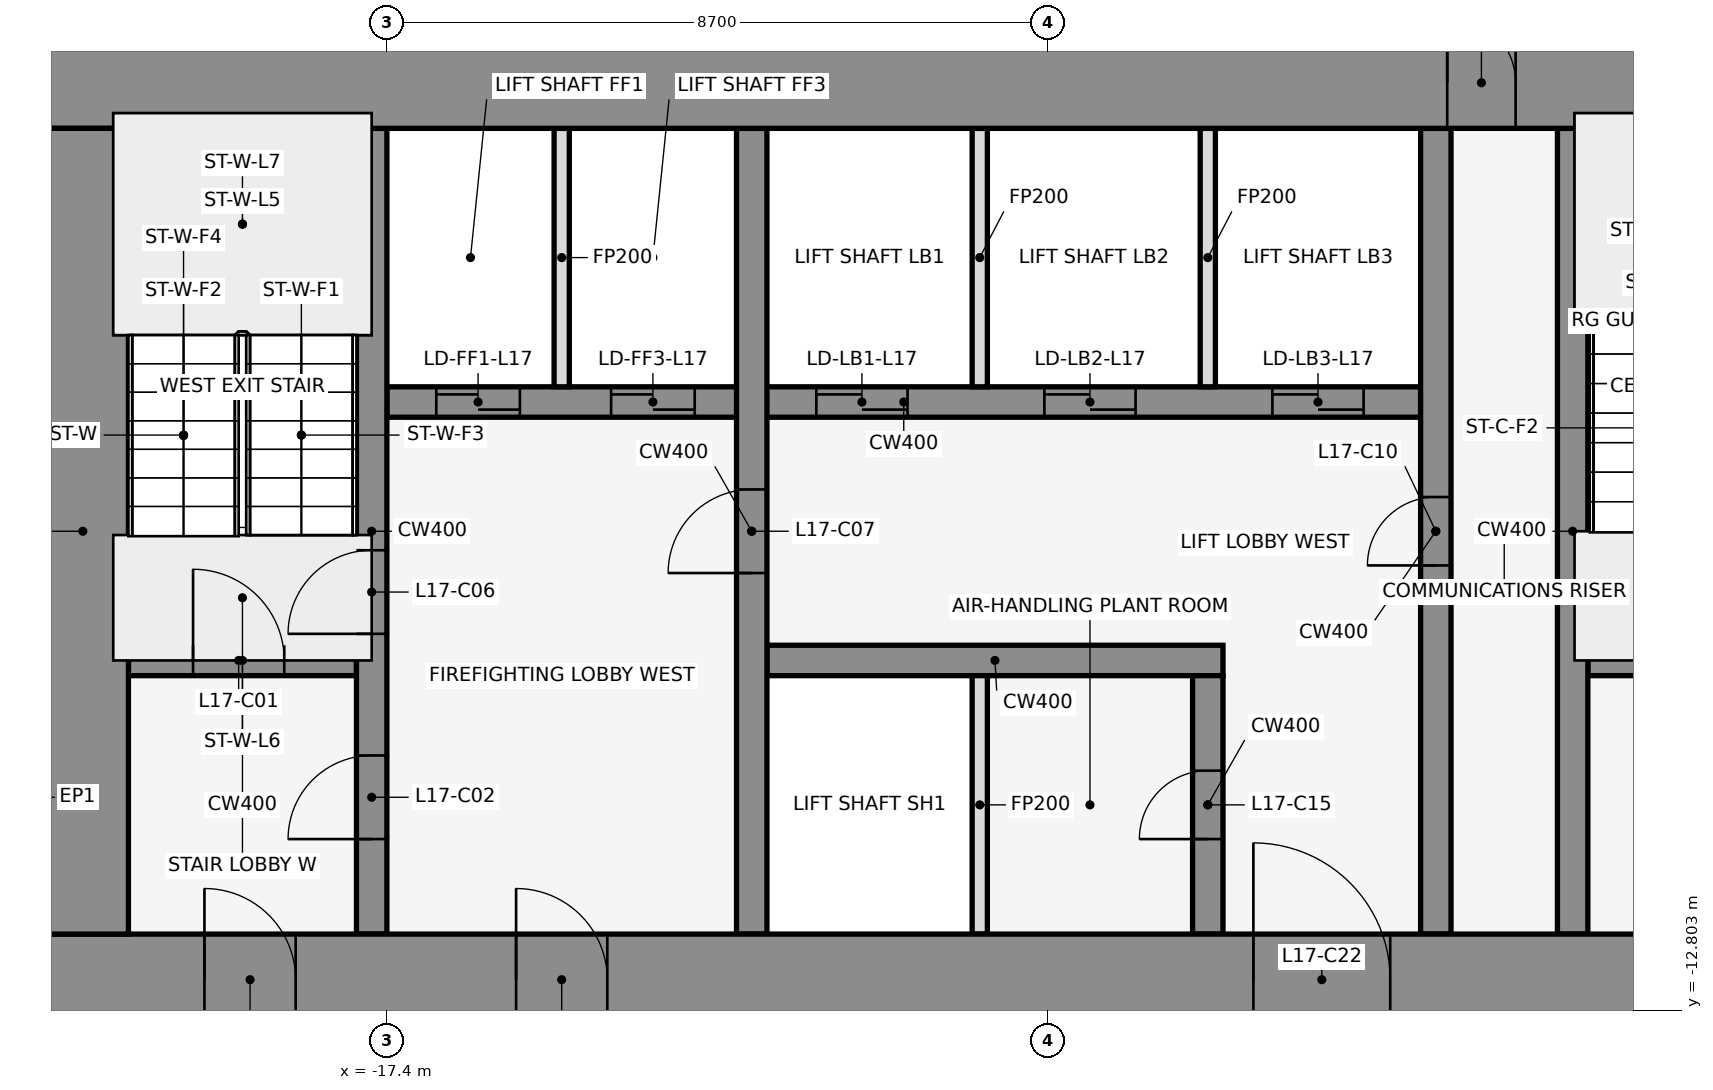
"""IFC4 building model, lengths in metres.
Left out: names, types, materials, properties, quantities, classifications, styles, units other than length and angle.
Written with IfcOpenShell. Run it as: python <this file> out.ifc"""

import sys

from ifc_helpers import new_model, si_unit, direction, frame, frame_2d, origin, place, context, subcontext, project, spatial, rectangle, extrude, element, fill, save


model = new_model("IFC4")
c1 = context("Model", 3, precision=1e-05, world=origin(), true_north=direction((0.0, 1.0)))
c2 = subcontext(c1, "Body", "Model", "MODEL_VIEW")
j1 = project(units=[si_unit("LENGTHUNIT", "METRE"), si_unit("PLANEANGLEUNIT", "RADIAN")], contexts=[c1])
p1 = place(None, origin())
s1 = spatial("IfcSite", under=j1, at=p1, CompositionType="ELEMENT")
p2 = place(p1, origin())
s2 = spatial("IfcBuilding", under=s1, at=p2, CompositionType="ELEMENT")
p3 = place(p2, frame((0.0, 0.0, 84.5)))
s3 = spatial("IfcBuildingStorey", under=s2, at=p3, CompositionType="ELEMENT", Elevation=84.5)
for number, where, z_axis, x_axis in (
    (1, (-0.068, -0.105, 0.0), (0.0, 0.0, 1.0), (-0.84, 0.543, 0.0)),
    (2, (-14.599, 1.08, 0.0), (0.0, 0.0, 1.0), (-0.84, -0.543, 0.0)),
):
    element("IfcWall", number, at=place(p3, frame(where, z_axis=z_axis, x_axis=x_axis)), inside=s3, PredefinedType="STANDARD", context=c2, shape_type="SweptSolid", body=[
        extrude(rectangle(XDim=2.183, YDim=0.25, at=frame_2d((1.091, 0.0))), origin(), (0.0, 0.0, 1.0), 5.25),
    ])
p4 = place(p3, frame((-20.8, -8.2, 0.0), z_axis=(0.0, 0.0, 1.0), x_axis=(1.0, 0.0, 0.0)))
e3 = element("IfcWall", 3, at=p4, inside=s3, PredefinedType="SHEAR", context=c2, shape_type="SweptSolid", body=[
    extrude(rectangle(XDim=3.0, YDim=0.4, at=frame_2d((1.5, 0.0))), origin(), (0.0, 0.0, 1.0), 5.4),
])
p5 = place(p4, frame((0.85, 0.0, 0.0)))
e4 = element("IfcOpeningElement", 4, at=p5, cuts=e3, PredefinedType="OPENING", context=c2, shape_type="SweptSolid", body=[
    extrude(rectangle(XDim=1.2, YDim=2.1, at=frame_2d((0.6, 1.05))), frame((0.0, 0.212, 0.0), z_axis=(0.0, -1.0, 0.0), x_axis=(1.0, 0.0, 0.0)), (0.0, 0.0, 1.0), 0.424),
])
p6 = place(p3, frame((-12.4, -8.2, 0.0), z_axis=(0.0, 0.0, 1.0), x_axis=(1.0, 0.0, 0.0)))
e5 = element("IfcWall", 5, at=p6, inside=s3, PredefinedType="SHEAR", context=c2, shape_type="SweptSolid", body=[
    extrude(rectangle(XDim=6.0, YDim=0.4, at=frame_2d((3.0, 0.0))), origin(), (0.0, 0.0, 1.0), 5.4),
])
p7 = place(p3, frame((-1.6, -8.2, 0.0), z_axis=(0.0, 0.0, 1.0), x_axis=(1.0, 0.0, 0.0)))
e6 = element("IfcWall", 6, at=p7, inside=s3, PredefinedType="SHEAR", context=c2, shape_type="SweptSolid", body=[
    extrude(rectangle(XDim=3.2, YDim=0.4, at=frame_2d((1.6, 0.0))), origin(), (0.0, 0.0, 1.0), 5.4),
])
p8 = place(p7, frame((1.05, 0.0, 0.0)))
e7 = element("IfcOpeningElement", 7, at=p8, cuts=e6, PredefinedType="OPENING", context=c2, shape_type="SweptSolid", body=[
    extrude(rectangle(XDim=1.2, YDim=2.1, at=frame_2d((0.6, 1.05))), frame((0.0, 0.212, 0.0), z_axis=(0.0, -1.0, 0.0), x_axis=(1.0, 0.0, 0.0)), (0.0, 0.0, 1.0), 0.424),
])
p9 = place(p3, frame((-17.4, -4.8, 0.0), z_axis=(0.0, 0.0, 1.0), x_axis=(1.0, 0.0, 0.0)))
e8 = element("IfcWall", 8, at=p9, inside=s3, PredefinedType="SHEAR", context=c2, shape_type="SweptSolid", body=[
    extrude(rectangle(XDim=13.6, YDim=0.4, at=frame_2d((6.8, 0.0))), origin(), (0.0, 0.0, 1.0), 5.4),
])
p10 = place(p9, frame((0.65, 0.0, 0.0)))
e9 = element("IfcOpeningElement", 9, at=p10, cuts=e8, PredefinedType="OPENING", context=c2, shape_type="SweptSolid", body=[
    extrude(rectangle(XDim=1.1, YDim=2.1, at=frame_2d((0.55, 1.05))), frame((0.0, 0.212, 0.0), z_axis=(0.0, -1.0, 0.0), x_axis=(1.0, 0.0, 0.0)), (0.0, 0.0, 1.0), 0.424),
])
p11 = place(p9, frame((2.95, 0.0, 0.0)))
e10 = element("IfcOpeningElement", 10, at=p11, cuts=e8, PredefinedType="OPENING", context=c2, shape_type="SweptSolid", body=[
    extrude(rectangle(XDim=1.1, YDim=2.1, at=frame_2d((0.55, 1.05))), frame((0.0, 0.212, 0.0), z_axis=(0.0, -1.0, 0.0), x_axis=(1.0, 0.0, 0.0)), (0.0, 0.0, 1.0), 0.424),
])
p12 = place(p9, frame((5.65, 0.0, 0.0)))
e11 = element("IfcOpeningElement", 11, at=p12, cuts=e8, PredefinedType="OPENING", context=c2, shape_type="SweptSolid", body=[
    extrude(rectangle(XDim=1.2, YDim=2.1, at=frame_2d((0.6, 1.05))), frame((0.0, 0.212, 0.0), z_axis=(0.0, -1.0, 0.0), x_axis=(1.0, 0.0, 0.0)), (0.0, 0.0, 1.0), 0.424),
])
p13 = place(p9, frame((8.65, 0.0, 0.0)))
e12 = element("IfcOpeningElement", 12, at=p13, cuts=e8, PredefinedType="OPENING", context=c2, shape_type="SweptSolid", body=[
    extrude(rectangle(XDim=1.2, YDim=2.1, at=frame_2d((0.6, 1.05))), frame((0.0, 0.212, 0.0), z_axis=(0.0, -1.0, 0.0), x_axis=(1.0, 0.0, 0.0)), (0.0, 0.0, 1.0), 0.424),
])
p14 = place(p9, frame((11.65, 0.0, 0.0)))
e13 = element("IfcOpeningElement", 13, at=p14, cuts=e8, PredefinedType="OPENING", context=c2, shape_type="SweptSolid", body=[
    extrude(rectangle(XDim=1.2, YDim=2.1, at=frame_2d((0.6, 1.05))), frame((0.0, 0.212, 0.0), z_axis=(0.0, -1.0, 0.0), x_axis=(1.0, 0.0, 0.0)), (0.0, 0.0, 1.0), 0.424),
])
p15 = place(p3, frame((-17.6, -11.8, 0.0), z_axis=(0.0, 0.0, 1.0), x_axis=(0.0, 1.0, 0.0)))
e14 = element("IfcWall", 14, at=p15, inside=s3, PredefinedType="SHEAR", context=c2, shape_type="SweptSolid", body=[
    extrude(rectangle(XDim=10.6, YDim=0.4, at=frame_2d((5.3, 0.0))), origin(), (0.0, 0.0, 1.0), 5.4),
])
p16 = place(p15, frame((1.25, 0.0, 0.0)))
e15 = element("IfcOpeningElement", 15, at=p16, cuts=e14, PredefinedType="OPENING", context=c2, shape_type="SweptSolid", body=[
    extrude(rectangle(XDim=1.1, YDim=2.1, at=frame_2d((0.55, 1.05))), frame((0.0, 0.212, 0.0), z_axis=(0.0, -1.0, 0.0), x_axis=(1.0, 0.0, 0.0)), (0.0, 0.0, 1.0), 0.424),
])
p17 = place(p15, frame((3.95, 0.0, 0.0)))
e16 = element("IfcOpeningElement", 16, at=p17, cuts=e14, PredefinedType="OPENING", context=c2, shape_type="SweptSolid", body=[
    extrude(rectangle(XDim=1.1, YDim=2.1, at=frame_2d((0.55, 1.05))), frame((0.0, 0.212, 0.0), z_axis=(0.0, -1.0, 0.0), x_axis=(1.0, 0.0, 0.0)), (0.0, 0.0, 1.0), 0.424),
])
p18 = place(p3, frame((-15.1, -4.6, 0.0), z_axis=(0.0, 0.0, 1.0), x_axis=(0.0, 1.0, 0.0)))
e17 = element("IfcWall", 17, at=p18, inside=s3, PredefinedType="PARTITIONING", context=c2, shape_type="SweptSolid", body=[
    extrude(rectangle(XDim=3.4, YDim=0.2, at=frame_2d((1.7, 0.0))), origin(), (0.0, 0.0, 1.0), 4.318),
])
p19 = place(p3, frame((-12.6, -11.8, 0.0), z_axis=(0.0, 0.0, 1.0), x_axis=(0.0, 1.0, 0.0)))
e18 = element("IfcWall", 18, at=p19, inside=s3, PredefinedType="SHEAR", context=c2, shape_type="SweptSolid", body=[
    extrude(rectangle(XDim=10.6, YDim=0.4, at=frame_2d((5.3, 0.0))), origin(), (0.0, 0.0, 1.0), 5.4),
])
p20 = place(p19, frame((4.75, 0.0, 0.0)))
e19 = element("IfcOpeningElement", 19, at=p20, cuts=e18, PredefinedType="OPENING", context=c2, shape_type="SweptSolid", body=[
    extrude(rectangle(XDim=1.1, YDim=2.1, at=frame_2d((0.55, 1.05))), frame((0.0, 0.212, 0.0), z_axis=(0.0, -1.0, 0.0), x_axis=(1.0, 0.0, 0.0)), (0.0, 0.0, 1.0), 0.424),
])
for number, where, z_axis, x_axis in (
    (20, (-9.6, -11.8, 0.0), (0.0, 0.0, 1.0), (0.0, 1.0, 0.0)),
    (21, (-9.6, -4.6, 0.0), (0.0, 0.0, 1.0), (0.0, 1.0, 0.0)),
):
    element("IfcWall", number, at=place(p3, frame(where, z_axis=z_axis, x_axis=x_axis)), inside=s3, PredefinedType="PARTITIONING", context=c2, shape_type="SweptSolid", body=[
        extrude(rectangle(XDim=3.4, YDim=0.2, at=frame_2d((1.7, 0.0))), origin(), (0.0, 0.0, 1.0), 4.318),
    ])
p21 = place(p3, frame((-6.6, -11.8, 0.0), z_axis=(0.0, 0.0, 1.0), x_axis=(0.0, 1.0, 0.0)))
e22 = element("IfcWall", 22, at=p21, inside=s3, PredefinedType="SHEAR", context=c2, shape_type="SweptSolid", body=[
    extrude(rectangle(XDim=3.4, YDim=0.4, at=frame_2d((1.7, 0.0))), origin(), (0.0, 0.0, 1.0), 5.4),
])
p22 = place(p21, frame((1.25, 0.0, 0.0)))
e23 = element("IfcOpeningElement", 23, at=p22, cuts=e22, PredefinedType="OPENING", context=c2, shape_type="SweptSolid", body=[
    extrude(rectangle(XDim=0.9, YDim=2.1, at=frame_2d((0.45, 1.05))), frame((0.0, 0.212, 0.0), z_axis=(0.0, -1.0, 0.0), x_axis=(1.0, 0.0, 0.0)), (0.0, 0.0, 1.0), 0.424),
])
p23 = place(p3, frame((-6.6, -4.6, 0.0), z_axis=(0.0, 0.0, 1.0), x_axis=(0.0, 1.0, 0.0)))
e24 = element("IfcWall", 24, at=p23, inside=s3, PredefinedType="PARTITIONING", context=c2, shape_type="SweptSolid", body=[
    extrude(rectangle(XDim=3.4, YDim=0.2, at=frame_2d((1.7, 0.0))), origin(), (0.0, 0.0, 1.0), 4.318),
])
p24 = place(p3, frame((-3.6, -11.8, 0.0), z_axis=(0.0, 0.0, 1.0), x_axis=(0.0, 1.0, 0.0)))
e25 = element("IfcWall", 25, at=p24, inside=s3, PredefinedType="SHEAR", context=c2, shape_type="SweptSolid", body=[
    extrude(rectangle(XDim=10.6, YDim=0.4, at=frame_2d((5.3, 0.0))), origin(), (0.0, 0.0, 1.0), 5.4),
])
p25 = place(p24, frame((4.85, 0.0, 0.0)))
e26 = element("IfcOpeningElement", 26, at=p25, cuts=e25, PredefinedType="OPENING", context=c2, shape_type="SweptSolid", body=[
    extrude(rectangle(XDim=0.9, YDim=2.1, at=frame_2d((0.45, 1.05))), frame((0.0, 0.212, 0.0), z_axis=(0.0, -1.0, 0.0), x_axis=(1.0, 0.0, 0.0)), (0.0, 0.0, 1.0), 0.424),
])
p26 = place(p3, frame((-1.8, -11.8, 0.0), z_axis=(0.0, 0.0, 1.0), x_axis=(0.0, 1.0, 0.0)))
e27 = element("IfcWall", 27, at=p26, inside=s3, PredefinedType="SHEAR", context=c2, shape_type="SweptSolid", body=[
    extrude(rectangle(XDim=10.6, YDim=0.4, at=frame_2d((5.3, 0.0))), origin(), (0.0, 0.0, 1.0), 5.4),
])
p27 = place(p3, frame((-22.0, -0.6, 0.0), z_axis=(0.0, 0.0, 1.0), x_axis=(1.0, 0.0, 0.0)))
e28 = element("IfcWall", 28, at=p27, inside=s3, PredefinedType="SHEAR", context=c2, shape_type="SweptSolid", body=[
    extrude(rectangle(XDim=44.0, YDim=1.2, at=frame_2d((22.0, 0.0))), origin(), (0.0, 0.0, 1.0), 5.4),
])
p28 = place(p27, frame((18.55, 0.0, 0.0)))
e29 = element("IfcOpeningElement", 29, at=p28, cuts=e28, PredefinedType="OPENING", context=c2, shape_type="SweptSolid", body=[
    extrude(rectangle(XDim=0.9, YDim=2.1, at=frame_2d((0.45, 1.05))), frame((0.0, 0.612, 0.0), z_axis=(0.0, -1.0, 0.0), x_axis=(1.0, 0.0, 0.0)), (0.0, 0.0, 1.0), 1.224),
])
p29 = place(p27, frame((24.55, 0.0, 0.0)))
e30 = element("IfcOpeningElement", 30, at=p29, cuts=e28, PredefinedType="OPENING", context=c2, shape_type="SweptSolid", body=[
    extrude(rectangle(XDim=0.9, YDim=2.1, at=frame_2d((0.45, 1.05))), frame((0.0, 0.612, 0.0), z_axis=(0.0, -1.0, 0.0), x_axis=(1.0, 0.0, 0.0)), (0.0, 0.0, 1.0), 1.224),
])
p30 = place(p3, frame((-22.0, -12.4, 0.0), z_axis=(0.0, 0.0, 1.0), x_axis=(1.0, 0.0, 0.0)))
e31 = element("IfcWall", 31, at=p30, inside=s3, PredefinedType="SHEAR", context=c2, shape_type="SweptSolid", body=[
    extrude(rectangle(XDim=44.0, YDim=1.2, at=frame_2d((22.0, 0.0))), origin(), (0.0, 0.0, 1.0), 5.4),
])
p31 = place(p30, frame((2.2, 0.0, 0.0)))
e32 = element("IfcOpeningElement", 32, at=p31, cuts=e31, PredefinedType="OPENING", context=c2, shape_type="SweptSolid", body=[
    extrude(rectangle(XDim=1.2, YDim=2.1, at=frame_2d((0.6, 1.05))), frame((0.0, 0.612, 0.0), z_axis=(0.0, -1.0, 0.0), x_axis=(1.0, 0.0, 0.0)), (0.0, 0.0, 1.0), 1.224),
])
p32 = place(p30, frame((21.4, 0.0, 0.0)))
e33 = element("IfcOpeningElement", 33, at=p32, cuts=e31, PredefinedType="OPENING", context=c2, shape_type="SweptSolid", body=[
    extrude(rectangle(XDim=1.2, YDim=2.1, at=frame_2d((0.6, 1.05))), frame((0.0, 0.612, 0.0), z_axis=(0.0, -1.0, 0.0), x_axis=(1.0, 0.0, 0.0)), (0.0, 0.0, 1.0), 1.224),
])
p33 = place(p30, frame((40.6, 0.0, 0.0)))
e34 = element("IfcOpeningElement", 34, at=p33, cuts=e31, PredefinedType="OPENING", context=c2, shape_type="SweptSolid", body=[
    extrude(rectangle(XDim=1.2, YDim=2.1, at=frame_2d((0.6, 1.05))), frame((0.0, 0.612, 0.0), z_axis=(0.0, -1.0, 0.0), x_axis=(1.0, 0.0, 0.0)), (0.0, 0.0, 1.0), 1.224),
])
p34 = place(p30, frame((16.0, 0.0, 0.0)))
e35 = element("IfcOpeningElement", 35, at=p34, cuts=e31, PredefinedType="OPENING", context=c2, shape_type="SweptSolid", body=[
    extrude(rectangle(XDim=1.8, YDim=2.1, at=frame_2d((0.9, 1.05))), frame((0.0, 0.612, 0.0), z_axis=(0.0, -1.0, 0.0), x_axis=(1.0, 0.0, 0.0)), (0.0, 0.0, 1.0), 1.224),
])
p35 = place(p30, frame((6.3, 0.0, 0.0)))
e36 = element("IfcOpeningElement", 36, at=p35, cuts=e31, PredefinedType="OPENING", context=c2, shape_type="SweptSolid", body=[
    extrude(rectangle(XDim=1.2, YDim=2.1, at=frame_2d((0.6, 1.05))), frame((0.0, 0.612, 0.0), z_axis=(0.0, -1.0, 0.0), x_axis=(1.0, 0.0, 0.0)), (0.0, 0.0, 1.0), 1.224),
])
p36 = place(p30, frame((26.2, 0.0, 0.0)))
e37 = element("IfcOpeningElement", 37, at=p36, cuts=e31, PredefinedType="OPENING", context=c2, shape_type="SweptSolid", body=[
    extrude(rectangle(XDim=1.8, YDim=2.1, at=frame_2d((0.9, 1.05))), frame((0.0, 0.612, 0.0), z_axis=(0.0, -1.0, 0.0), x_axis=(1.0, 0.0, 0.0)), (0.0, 0.0, 1.0), 1.224),
])
p37 = place(p30, frame((36.5, 0.0, 0.0)))
e38 = element("IfcOpeningElement", 38, at=p37, cuts=e31, PredefinedType="OPENING", context=c2, shape_type="SweptSolid", body=[
    extrude(rectangle(XDim=1.2, YDim=2.1, at=frame_2d((0.6, 1.05))), frame((0.0, 0.612, 0.0), z_axis=(0.0, -1.0, 0.0), x_axis=(1.0, 0.0, 0.0)), (0.0, 0.0, 1.0), 1.224),
])
p38 = place(p3, frame((-21.4, -11.8, 0.0), z_axis=(0.0, 0.0, 1.0), x_axis=(0.0, 1.0, 0.0)))
e39 = element("IfcWall", 39, at=p38, inside=s3, PredefinedType="SHEAR", context=c2, shape_type="SweptSolid", body=[
    extrude(rectangle(XDim=10.6, YDim=1.2, at=frame_2d((5.3, 0.0))), origin(), (0.0, 0.0, 1.0), 5.4),
])
p39 = place(p5, origin())
e40 = element("IfcDoor", 40, at=p39, inside=s3, OperationType="SINGLE_SWING_LEFT", PredefinedType="DOOR", context=c2, shape_type="SweptSolid", body=[
    extrude(rectangle(XDim=1.2, YDim=2.1, at=frame_2d((0.6, 1.05))), frame((0.0, 0.025, 0.0), z_axis=(0.0, -1.0, 0.0), x_axis=(1.0, 0.0, 0.0)), (0.0, 0.0, 1.0), 0.05),
])
fill(e4, e40)
p40 = place(p16, frame((1.1, 0.0, 0.0), z_axis=(0.0, 0.0, 1.0), x_axis=(-1.0, 0.0, 0.0)))
e41 = element("IfcDoor", 41, at=p40, inside=s3, OperationType="SINGLE_SWING_LEFT", PredefinedType="DOOR", context=c2, shape_type="SweptSolid", body=[
    extrude(rectangle(XDim=1.1, YDim=2.1, at=frame_2d((0.55, 1.05))), frame((0.0, 0.025, 0.0), z_axis=(0.0, -1.0, 0.0), x_axis=(1.0, 0.0, 0.0)), (0.0, 0.0, 1.0), 0.05),
])
fill(e15, e41)
p41 = place(p10, origin())
e42 = element("IfcDoor", 42, at=p41, inside=s3, OperationType="DOUBLE_DOOR_SLIDING", PredefinedType="DOOR", context=c2, shape_type="SweptSolid", body=[
    extrude(rectangle(XDim=1.1, YDim=2.1, at=frame_2d((0.55, 1.05))), frame((0.0, 0.025, 0.0), z_axis=(0.0, -1.0, 0.0), x_axis=(1.0, 0.0, 0.0)), (0.0, 0.0, 1.0), 0.05),
])
fill(e9, e42)
p42 = place(p11, origin())
e43 = element("IfcDoor", 43, at=p42, inside=s3, OperationType="DOUBLE_DOOR_SLIDING", PredefinedType="DOOR", context=c2, shape_type="SweptSolid", body=[
    extrude(rectangle(XDim=1.1, YDim=2.1, at=frame_2d((0.55, 1.05))), frame((0.0, 0.025, 0.0), z_axis=(0.0, -1.0, 0.0), x_axis=(1.0, 0.0, 0.0)), (0.0, 0.0, 1.0), 0.05),
])
fill(e10, e43)
p43 = place(p12, origin())
e44 = element("IfcDoor", 44, at=p43, inside=s3, OperationType="DOUBLE_DOOR_SLIDING", PredefinedType="DOOR", context=c2, shape_type="SweptSolid", body=[
    extrude(rectangle(XDim=1.2, YDim=2.1, at=frame_2d((0.6, 1.05))), frame((0.0, 0.025, 0.0), z_axis=(0.0, -1.0, 0.0), x_axis=(1.0, 0.0, 0.0)), (0.0, 0.0, 1.0), 0.05),
])
fill(e11, e44)
p44 = place(p13, origin())
e45 = element("IfcDoor", 45, at=p44, inside=s3, OperationType="DOUBLE_DOOR_SLIDING", PredefinedType="DOOR", context=c2, shape_type="SweptSolid", body=[
    extrude(rectangle(XDim=1.2, YDim=2.1, at=frame_2d((0.6, 1.05))), frame((0.0, 0.025, 0.0), z_axis=(0.0, -1.0, 0.0), x_axis=(1.0, 0.0, 0.0)), (0.0, 0.0, 1.0), 0.05),
])
fill(e12, e45)
p45 = place(p14, origin())
e46 = element("IfcDoor", 46, at=p45, inside=s3, OperationType="DOUBLE_DOOR_SLIDING", PredefinedType="DOOR", context=c2, shape_type="SweptSolid", body=[
    extrude(rectangle(XDim=1.2, YDim=2.1, at=frame_2d((0.6, 1.05))), frame((0.0, 0.025, 0.0), z_axis=(0.0, -1.0, 0.0), x_axis=(1.0, 0.0, 0.0)), (0.0, 0.0, 1.0), 0.05),
])
fill(e13, e46)
p46 = place(p17, frame((1.1, 0.0, 0.0), z_axis=(0.0, 0.0, 1.0), x_axis=(-1.0, 0.0, 0.0)))
e47 = element("IfcDoor", 47, at=p46, inside=s3, OperationType="SINGLE_SWING_LEFT", PredefinedType="DOOR", context=c2, shape_type="SweptSolid", body=[
    extrude(rectangle(XDim=1.1, YDim=2.1, at=frame_2d((0.55, 1.05))), frame((0.0, 0.025, 0.0), z_axis=(0.0, -1.0, 0.0), x_axis=(1.0, 0.0, 0.0)), (0.0, 0.0, 1.0), 0.05),
])
fill(e16, e47)
p47 = place(p20, origin())
e48 = element("IfcDoor", 48, at=p47, inside=s3, OperationType="SINGLE_SWING_LEFT", PredefinedType="DOOR", context=c2, shape_type="SweptSolid", body=[
    extrude(rectangle(XDim=1.1, YDim=2.1, at=frame_2d((0.55, 1.05))), frame((0.0, 0.025, 0.0), z_axis=(0.0, -1.0, 0.0), x_axis=(1.0, 0.0, 0.0)), (0.0, 0.0, 1.0), 0.05),
])
fill(e19, e48)
p48 = place(p25, frame((0.9, 0.0, 0.0), z_axis=(0.0, 0.0, 1.0), x_axis=(-1.0, 0.0, 0.0)))
e49 = element("IfcDoor", 49, at=p48, inside=s3, OperationType="SINGLE_SWING_LEFT", PredefinedType="DOOR", context=c2, shape_type="SweptSolid", body=[
    extrude(rectangle(XDim=0.9, YDim=2.1, at=frame_2d((0.45, 1.05))), frame((0.0, 0.025, 0.0), z_axis=(0.0, -1.0, 0.0), x_axis=(1.0, 0.0, 0.0)), (0.0, 0.0, 1.0), 0.05),
])
fill(e26, e49)
p49 = place(p22, origin())
e50 = element("IfcDoor", 50, at=p49, inside=s3, OperationType="SINGLE_SWING_LEFT", PredefinedType="DOOR", context=c2, shape_type="SweptSolid", body=[
    extrude(rectangle(XDim=0.9, YDim=2.1, at=frame_2d((0.45, 1.05))), frame((0.0, 0.025, 0.0), z_axis=(0.0, -1.0, 0.0), x_axis=(1.0, 0.0, 0.0)), (0.0, 0.0, 1.0), 0.05),
])
fill(e23, e50)
p50 = place(p28, origin())
e51 = element("IfcDoor", 51, at=p50, inside=s3, OperationType="SINGLE_SWING_LEFT", PredefinedType="DOOR", context=c2, shape_type="SweptSolid", body=[
    extrude(rectangle(XDim=0.9, YDim=2.1, at=frame_2d((0.45, 1.05))), frame((0.0, 0.025, 0.0), z_axis=(0.0, -1.0, 0.0), x_axis=(1.0, 0.0, 0.0)), (0.0, 0.0, 1.0), 0.05),
])
fill(e29, e51)
p51 = place(p31, frame((1.2, 0.0, 0.0), z_axis=(0.0, 0.0, 1.0), x_axis=(-1.0, 0.0, 0.0)))
e52 = element("IfcDoor", 52, at=p51, inside=s3, OperationType="SINGLE_SWING_RIGHT", PredefinedType="DOOR", context=c2, shape_type="SweptSolid", body=[
    extrude(rectangle(XDim=1.2, YDim=2.1, at=frame_2d((0.6, 1.05))), frame((0.0, 0.025, 0.0), z_axis=(0.0, -1.0, 0.0), x_axis=(1.0, 0.0, 0.0)), (0.0, 0.0, 1.0), 0.05),
])
fill(e32, e52)
p52 = place(p34, origin())
e53 = element("IfcDoor", 53, at=p52, inside=s3, OperationType="SINGLE_SWING_LEFT", PredefinedType="DOOR", context=c2, shape_type="SweptSolid", body=[
    extrude(rectangle(XDim=1.8, YDim=2.1, at=frame_2d((0.9, 1.05))), frame((0.0, 0.025, 0.0), z_axis=(0.0, -1.0, 0.0), x_axis=(1.0, 0.0, 0.0)), (0.0, 0.0, 1.0), 0.05),
])
fill(e35, e53)
p53 = place(p35, frame((1.2, 0.0, 0.0), z_axis=(0.0, 0.0, 1.0), x_axis=(-1.0, 0.0, 0.0)))
e54 = element("IfcDoor", 54, at=p53, inside=s3, OperationType="SINGLE_SWING_RIGHT", PredefinedType="DOOR", context=c2, shape_type="SweptSolid", body=[
    extrude(rectangle(XDim=1.2, YDim=2.1, at=frame_2d((0.6, 1.05))), frame((0.0, 0.025, 0.0), z_axis=(0.0, -1.0, 0.0), x_axis=(1.0, 0.0, 0.0)), (0.0, 0.0, 1.0), 0.05),
])
fill(e36, e54)
save(model, sys.argv[1])
